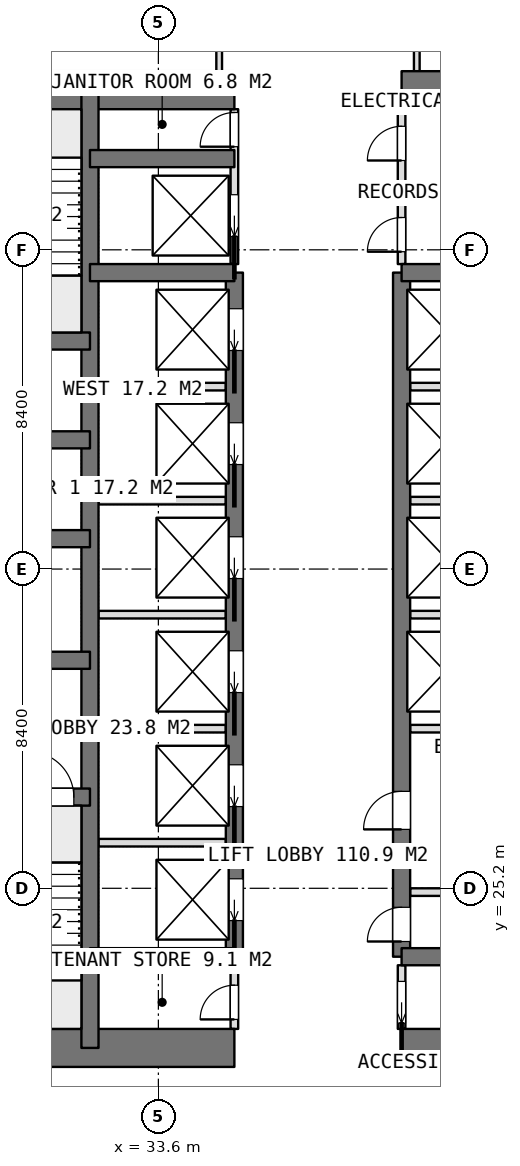
"""IFC4 building model, lengths in metres.
Left out: names, types, materials, properties, quantities, classifications, styles, units other than length and angle.
Written with IfcOpenShell. Run it as: python <this file> out.ifc"""

import sys

from ifc_helpers import new_model, si_unit, direction, frame, frame_2d, origin, place, context, subcontext, project, spatial, rectangle, extrude, element, fill, save


model = new_model("IFC4")
c1 = context("Model", 3, precision=1e-05, world=origin(), true_north=direction((0.0, 1.0)))
c2 = subcontext(c1, "Body", "Model", "MODEL_VIEW")
j1 = project(units=[si_unit("LENGTHUNIT", "METRE"), si_unit("PLANEANGLEUNIT", "RADIAN")], contexts=[c1])
p1 = place(None, origin())
s1 = spatial("IfcSite", under=j1, at=p1, CompositionType="ELEMENT")
p2 = place(p1, origin())
s2 = spatial("IfcBuilding", under=s1, at=p2, CompositionType="ELEMENT")
p3 = place(p2, frame((0.0, 0.0, 140.3)))
s3 = spatial("IfcBuildingStorey", under=s2, at=p3, CompositionType="ELEMENT", Elevation=140.3)
p4 = place(p3, frame((25.2, 21.0, 0.0), z_axis=(0.0, 0.0, 1.0), x_axis=(1.0, 0.0, 0.0)))
e1 = element("IfcWall", 1, at=p4, inside=s3, PredefinedType="SHEAR", context=c2, shape_type="SweptSolid", body=[
    extrude(rectangle(XDim=10.4, YDim=1.0, at=frame_2d((5.2, 0.0))), origin(), (0.0, 0.0, 1.0), 3.75),
])
p5 = place(p3, frame((40.0, 21.0, 0.0), z_axis=(0.0, 0.0, 1.0), x_axis=(1.0, 0.0, 0.0)))
e2 = element("IfcWall", 2, at=p5, inside=s3, PredefinedType="SHEAR", context=c2, shape_type="SweptSolid", body=[
    extrude(rectangle(XDim=10.4, YDim=1.0, at=frame_2d((5.2, 0.0))), origin(), (0.0, 0.0, 1.0), 3.75),
])
p6 = place(p3, frame((25.2, 46.2, 0.0), z_axis=(0.0, 0.0, 1.0), x_axis=(1.0, 0.0, 0.0)))
e3 = element("IfcWall", 3, at=p6, inside=s3, PredefinedType="SHEAR", context=c2, shape_type="SweptSolid", body=[
    extrude(rectangle(XDim=10.4, YDim=1.0, at=frame_2d((5.2, 0.0))), origin(), (0.0, 0.0, 1.0), 3.75),
])
p7 = place(p3, frame((40.0, 46.2, 0.0), z_axis=(0.0, 0.0, 1.0), x_axis=(1.0, 0.0, 0.0)))
e4 = element("IfcWall", 4, at=p7, inside=s3, PredefinedType="SHEAR", context=c2, shape_type="SweptSolid", body=[
    extrude(rectangle(XDim=10.4, YDim=1.0, at=frame_2d((5.2, 0.0))), origin(), (0.0, 0.0, 1.0), 3.75),
])
p8 = place(p3, frame((31.8, 21.0, 0.0), z_axis=(0.0, 0.0, 1.0), x_axis=(0.0, 1.0, 0.0)))
e5 = element("IfcWall", 5, at=p8, inside=s3, PredefinedType="SHEAR", context=c2, shape_type="SweptSolid", body=[
    extrude(rectangle(XDim=25.2, YDim=0.45, at=frame_2d((12.6, 0.0))), origin(), (0.0, 0.0, 1.0), 3.75),
])
p9 = place(p3, frame((35.6, 23.4, 0.0), z_axis=(0.0, 0.0, 1.0), x_axis=(0.0, 1.0, 0.0)))
e6 = element("IfcWall", 6, at=p9, inside=s3, PredefinedType="SHEAR", context=c2, shape_type="SweptSolid", body=[
    extrude(rectangle(XDim=18.0, YDim=0.45, at=frame_2d((9.0, 0.0))), origin(), (0.0, 0.0, 1.0), 3.75),
])
p10 = place(p9, frame((0.95, 0.0, 0.0)))
e7 = element("IfcOpeningElement", 7, at=p10, cuts=e6, PredefinedType="OPENING", context=c2, shape_type="SweptSolid", body=[
    extrude(rectangle(XDim=1.1, YDim=2.1, at=frame_2d((0.55, 1.05))), frame((0.0, 0.235, 0.0), z_axis=(0.0, -1.0, 0.0), x_axis=(1.0, 0.0, 0.0)), (0.0, 0.0, 1.0), 0.47),
])
p11 = place(p9, frame((3.95, 0.0, 0.0)))
e8 = element("IfcOpeningElement", 8, at=p11, cuts=e6, PredefinedType="OPENING", context=c2, shape_type="SweptSolid", body=[
    extrude(rectangle(XDim=1.1, YDim=2.1, at=frame_2d((0.55, 1.05))), frame((0.0, 0.235, 0.0), z_axis=(0.0, -1.0, 0.0), x_axis=(1.0, 0.0, 0.0)), (0.0, 0.0, 1.0), 0.47),
])
p12 = place(p9, frame((6.95, 0.0, 0.0)))
e9 = element("IfcOpeningElement", 9, at=p12, cuts=e6, PredefinedType="OPENING", context=c2, shape_type="SweptSolid", body=[
    extrude(rectangle(XDim=1.1, YDim=2.1, at=frame_2d((0.55, 1.05))), frame((0.0, 0.235, 0.0), z_axis=(0.0, -1.0, 0.0), x_axis=(1.0, 0.0, 0.0)), (0.0, 0.0, 1.0), 0.47),
])
p13 = place(p9, frame((9.95, 0.0, 0.0)))
e10 = element("IfcOpeningElement", 10, at=p13, cuts=e6, PredefinedType="OPENING", context=c2, shape_type="SweptSolid", body=[
    extrude(rectangle(XDim=1.1, YDim=2.1, at=frame_2d((0.55, 1.05))), frame((0.0, 0.235, 0.0), z_axis=(0.0, -1.0, 0.0), x_axis=(1.0, 0.0, 0.0)), (0.0, 0.0, 1.0), 0.47),
])
p14 = place(p9, frame((12.95, 0.0, 0.0)))
e11 = element("IfcOpeningElement", 11, at=p14, cuts=e6, PredefinedType="OPENING", context=c2, shape_type="SweptSolid", body=[
    extrude(rectangle(XDim=1.1, YDim=2.1, at=frame_2d((0.55, 1.05))), frame((0.0, 0.235, 0.0), z_axis=(0.0, -1.0, 0.0), x_axis=(1.0, 0.0, 0.0)), (0.0, 0.0, 1.0), 0.47),
])
p15 = place(p9, frame((15.95, 0.0, 0.0)))
e12 = element("IfcOpeningElement", 12, at=p15, cuts=e6, PredefinedType="OPENING", context=c2, shape_type="SweptSolid", body=[
    extrude(rectangle(XDim=1.1, YDim=2.1, at=frame_2d((0.55, 1.05))), frame((0.0, 0.235, 0.0), z_axis=(0.0, -1.0, 0.0), x_axis=(1.0, 0.0, 0.0)), (0.0, 0.0, 1.0), 0.47),
])
p16 = place(p3, frame((40.0, 23.4, 0.0), z_axis=(0.0, 0.0, 1.0), x_axis=(0.0, 1.0, 0.0)))
e13 = element("IfcWall", 13, at=p16, inside=s3, PredefinedType="SHEAR", context=c2, shape_type="SweptSolid", body=[
    extrude(rectangle(XDim=18.0, YDim=0.45, at=frame_2d((9.0, 0.0))), origin(), (0.0, 0.0, 1.0), 3.75),
])
p17 = place(p16, frame((0.4, 0.0, 0.0)))
e14 = element("IfcOpeningElement", 14, at=p17, cuts=e13, PredefinedType="OPENING", context=c2, shape_type="SweptSolid", body=[
    extrude(rectangle(XDim=0.9, YDim=2.1, at=frame_2d((0.45, 1.05))), frame((0.0, 0.235, 0.0), z_axis=(0.0, -1.0, 0.0), x_axis=(1.0, 0.0, 0.0)), (0.0, 0.0, 1.0), 0.47),
])
p18 = place(p16, frame((3.35, 0.0, 0.0)))
e15 = element("IfcOpeningElement", 15, at=p18, cuts=e13, PredefinedType="OPENING", context=c2, shape_type="SweptSolid", body=[
    extrude(rectangle(XDim=1.0, YDim=2.1, at=frame_2d((0.5, 1.05))), frame((0.0, 0.235, 0.0), z_axis=(0.0, -1.0, 0.0), x_axis=(1.0, 0.0, 0.0)), (0.0, 0.0, 1.0), 0.47),
])
for number, where, z_axis, x_axis in (
    (16, (31.8, 23.4, 0.0), (0.0, 0.0, 1.0), (1.0, 0.0, 0.0)),
    (17, (31.8, 41.4, 0.0), (0.0, 0.0, 1.0), (1.0, 0.0, 0.0)),
    (18, (31.8, 44.4, 0.0), (0.0, 0.0, 1.0), (1.0, 0.0, 0.0)),
    (19, (40.0, 23.4, 0.0), (0.0, 0.0, 1.0), (1.0, 0.0, 0.0)),
    (20, (40.0, 41.4, 0.0), (0.0, 0.0, 1.0), (1.0, 0.0, 0.0)),
):
    element("IfcWall", number, at=place(p3, frame(where, z_axis=z_axis, x_axis=x_axis)), inside=s3, PredefinedType="SHEAR", context=c2, shape_type="SweptSolid", body=[
        extrude(rectangle(XDim=3.8, YDim=0.45, at=frame_2d((1.9, 0.0))), origin(), (0.0, 0.0, 1.0), 3.75),
    ])
p19 = place(p3, frame((25.2, 27.6, 0.0), z_axis=(0.0, 0.0, 1.0), x_axis=(1.0, 0.0, 0.0)))
e21 = element("IfcWall", 21, at=p19, inside=s3, PredefinedType="SHEAR", context=c2, shape_type="SweptSolid", body=[
    extrude(rectangle(XDim=6.6, YDim=0.45, at=frame_2d((3.3, 0.0))), origin(), (0.0, 0.0, 1.0), 3.75),
])
p20 = place(p19, frame((4.975, 0.0, 0.0)))
e22 = element("IfcOpeningElement", 22, at=p20, cuts=e21, PredefinedType="OPENING", context=c2, shape_type="SweptSolid", body=[
    extrude(rectangle(XDim=1.2, YDim=2.1, at=frame_2d((0.6, 1.05))), frame((0.0, 0.235, 0.0), z_axis=(0.0, -1.0, 0.0), x_axis=(1.0, 0.0, 0.0)), (0.0, 0.0, 1.0), 0.47),
])
p21 = place(p3, frame((25.2, 31.2, 0.0), z_axis=(0.0, 0.0, 1.0), x_axis=(1.0, 0.0, 0.0)))
e23 = element("IfcWall", 23, at=p21, inside=s3, PredefinedType="SHEAR", context=c2, shape_type="SweptSolid", body=[
    extrude(rectangle(XDim=6.6, YDim=0.45, at=frame_2d((3.3, 0.0))), origin(), (0.0, 0.0, 1.0), 3.75),
])
p22 = place(p21, frame((2.65, 0.0, 0.0)))
e24 = element("IfcOpeningElement", 24, at=p22, cuts=e23, PredefinedType="OPENING", context=c2, shape_type="SweptSolid", body=[
    extrude(rectangle(XDim=1.3, YDim=2.1, at=frame_2d((0.65, 1.05))), frame((0.0, 0.235, 0.0), z_axis=(0.0, -1.0, 0.0), x_axis=(1.0, 0.0, 0.0)), (0.0, 0.0, 1.0), 0.47),
])
for number, where, z_axis, x_axis in (
    (25, (25.2, 34.4, 0.0), (0.0, 0.0, 1.0), (1.0, 0.0, 0.0)),
    (26, (25.2, 37.0, 0.0), (0.0, 0.0, 1.0), (1.0, 0.0, 0.0)),
    (27, (25.2, 39.6, 0.0), (0.0, 0.0, 1.0), (1.0, 0.0, 0.0)),
):
    element("IfcWall", number, at=place(p3, frame(where, z_axis=z_axis, x_axis=x_axis)), inside=s3, PredefinedType="SHEAR", context=c2, shape_type="SweptSolid", body=[
        extrude(rectangle(XDim=6.6, YDim=0.45, at=frame_2d((3.3, 0.0))), origin(), (0.0, 0.0, 1.0), 3.75),
    ])
for number, where, z_axis, x_axis in (
    (28, (32.025, 26.4, 0.0), (0.0, 0.0, 1.0), (1.0, 0.0, 0.0)),
    (29, (32.025, 29.4, 0.0), (0.0, 0.0, 1.0), (1.0, 0.0, 0.0)),
    (30, (32.025, 32.4, 0.0), (0.0, 0.0, 1.0), (1.0, 0.0, 0.0)),
    (31, (32.025, 35.4, 0.0), (0.0, 0.0, 1.0), (1.0, 0.0, 0.0)),
    (32, (32.025, 38.4, 0.0), (0.0, 0.0, 1.0), (1.0, 0.0, 0.0)),
):
    element("IfcWall", number, at=place(p3, frame(where, z_axis=z_axis, x_axis=x_axis)), inside=s3, PredefinedType="PARTITIONING", context=c2, shape_type="SweptSolid", body=[
        extrude(rectangle(XDim=3.35, YDim=0.2, at=frame_2d((1.675, 0.0))), origin(), (0.0, 0.0, 1.0), 3.5),
    ])
for number, where, z_axis, x_axis in (
    (33, (40.225, 29.4, 0.0), (0.0, 0.0, 1.0), (1.0, 0.0, 0.0)),
    (34, (40.225, 32.4, 0.0), (0.0, 0.0, 1.0), (1.0, 0.0, 0.0)),
    (35, (40.225, 35.4, 0.0), (0.0, 0.0, 1.0), (1.0, 0.0, 0.0)),
    (36, (40.225, 38.4, 0.0), (0.0, 0.0, 1.0), (1.0, 0.0, 0.0)),
):
    element("IfcWall", number, at=place(p3, frame(where, z_axis=z_axis, x_axis=x_axis)), inside=s3, PredefinedType="PARTITIONING", context=c2, shape_type="SweptSolid", body=[
        extrude(rectangle(XDim=3.35, YDim=0.2, at=frame_2d((1.675, 0.0))), origin(), (0.0, 0.0, 1.0), 3.5),
    ])
p23 = place(p3, frame((40.0, 21.5, 0.0), z_axis=(0.0, 0.0, 1.0), x_axis=(0.0, 1.0, 0.0)))
e37 = element("IfcWall", 37, at=p23, inside=s3, PredefinedType="PARTITIONING", context=c2, shape_type="SweptSolid", body=[
    extrude(rectangle(XDim=1.675, YDim=0.2, at=frame_2d((0.837, 0.0))), origin(), (0.0, 0.0, 1.0), 3.5),
])
p24 = place(p23, frame((0.15, 0.0, 0.0)))
e38 = element("IfcOpeningElement", 38, at=p24, cuts=e37, PredefinedType="OPENING", context=c2, shape_type="SweptSolid", body=[
    extrude(rectangle(XDim=1.1, YDim=2.1, at=frame_2d((0.55, 1.05))), frame((0.0, 0.11, 0.0), z_axis=(0.0, -1.0, 0.0), x_axis=(1.0, 0.0, 0.0)), (0.0, 0.0, 1.0), 0.22),
])
p25 = place(p3, frame((40.0, 41.625, 0.0), z_axis=(0.0, 0.0, 1.0), x_axis=(0.0, 1.0, 0.0)))
e39 = element("IfcWall", 39, at=p25, inside=s3, PredefinedType="PARTITIONING", context=c2, shape_type="SweptSolid", body=[
    extrude(rectangle(XDim=4.075, YDim=0.2, at=frame_2d((2.038, 0.0))), origin(), (0.0, 0.0, 1.0), 3.5),
])
p26 = place(p25, frame((2.725, 0.0, 0.0)))
e40 = element("IfcOpeningElement", 40, at=p26, cuts=e39, PredefinedType="OPENING", context=c2, shape_type="SweptSolid", body=[
    extrude(rectangle(XDim=0.9, YDim=2.1, at=frame_2d((0.45, 1.05))), frame((0.0, 0.11, 0.0), z_axis=(0.0, -1.0, 0.0), x_axis=(1.0, 0.0, 0.0)), (0.0, 0.0, 1.0), 0.22),
])
p27 = place(p25, frame((0.325, 0.0, 0.0)))
e41 = element("IfcOpeningElement", 41, at=p27, cuts=e39, PredefinedType="OPENING", context=c2, shape_type="SweptSolid", body=[
    extrude(rectangle(XDim=0.9, YDim=2.1, at=frame_2d((0.45, 1.05))), frame((0.0, 0.11, 0.0), z_axis=(0.0, -1.0, 0.0), x_axis=(1.0, 0.0, 0.0)), (0.0, 0.0, 1.0), 0.22),
])
p28 = place(p3, frame((35.6, 41.625, 0.0), z_axis=(0.0, 0.0, 1.0), x_axis=(0.0, 1.0, 0.0)))
e42 = element("IfcWall", 42, at=p28, inside=s3, PredefinedType="PARTITIONING", context=c2, shape_type="SweptSolid", body=[
    extrude(rectangle(XDim=4.075, YDim=0.2, at=frame_2d((2.038, 0.0))), origin(), (0.0, 0.0, 1.0), 3.5),
])
p29 = place(p28, frame((3.088, 0.0, 0.0)))
e43 = element("IfcOpeningElement", 43, at=p29, cuts=e42, PredefinedType="OPENING", context=c2, shape_type="SweptSolid", body=[
    extrude(rectangle(XDim=0.9, YDim=2.1, at=frame_2d((0.45, 1.05))), frame((0.0, 0.11, 0.0), z_axis=(0.0, -1.0, 0.0), x_axis=(1.0, 0.0, 0.0)), (0.0, 0.0, 1.0), 0.22),
])
p30 = place(p28, frame((0.725, 0.0, 0.0)))
e44 = element("IfcOpeningElement", 44, at=p30, cuts=e42, PredefinedType="OPENING", context=c2, shape_type="SweptSolid", body=[
    extrude(rectangle(XDim=1.1, YDim=2.1, at=frame_2d((0.55, 1.05))), frame((0.0, 0.11, 0.0), z_axis=(0.0, -1.0, 0.0), x_axis=(1.0, 0.0, 0.0)), (0.0, 0.0, 1.0), 0.22),
])
p31 = place(p3, frame((35.6, 21.5, 0.0), z_axis=(0.0, 0.0, 1.0), x_axis=(0.0, 1.0, 0.0)))
e45 = element("IfcWall", 45, at=p31, inside=s3, PredefinedType="PARTITIONING", context=c2, shape_type="SweptSolid", body=[
    extrude(rectangle(XDim=1.675, YDim=0.2, at=frame_2d((0.837, 0.0))), origin(), (0.0, 0.0, 1.0), 3.5),
])
p32 = place(p31, frame((0.25, 0.0, 0.0)))
e46 = element("IfcOpeningElement", 46, at=p32, cuts=e45, PredefinedType="OPENING", context=c2, shape_type="SweptSolid", body=[
    extrude(rectangle(XDim=0.9, YDim=2.1, at=frame_2d((0.45, 1.05))), frame((0.0, 0.11, 0.0), z_axis=(0.0, -1.0, 0.0), x_axis=(1.0, 0.0, 0.0)), (0.0, 0.0, 1.0), 0.22),
])
p33 = place(p3, frame((40.225, 25.1, 0.0), z_axis=(0.0, 0.0, 1.0), x_axis=(1.0, 0.0, 0.0)))
e47 = element("IfcWall", 47, at=p33, inside=s3, PredefinedType="PARTITIONING", context=c2, shape_type="SweptSolid", body=[
    extrude(rectangle(XDim=3.35, YDim=0.2, at=frame_2d((1.675, 0.0))), origin(), (0.0, 0.0, 1.0), 3.5),
])
p34 = place(p3, frame((40.0, 43.4, 0.0), z_axis=(0.0, 0.0, 1.0), x_axis=(1.0, 0.0, 0.0)))
e48 = element("IfcWall", 48, at=p34, inside=s3, PredefinedType="PARTITIONING", context=c2, shape_type="SweptSolid", body=[
    extrude(rectangle(XDim=3.575, YDim=0.2, at=frame_2d((1.788, 0.0))), origin(), (0.0, 0.0, 1.0), 3.5),
])
for number, where, z_axis, x_axis in (
    (49, (40.4, 46.7, 0.0), (0.0, 0.0, 1.0), (0.0, 1.0, 0.0)),
    (50, (35.2, 46.7, 0.0), (0.0, 0.0, 1.0), (0.0, 1.0, 0.0)),
):
    element("IfcWall", number, at=place(p3, frame(where, z_axis=z_axis, x_axis=x_axis)), inside=s3, PredefinedType="PARTITIONING", context=c2, shape_type="SweptSolid", body=[
        extrude(rectangle(XDim=2.625, YDim=0.15, at=frame_2d((1.312, 0.0))), origin(), (0.0, 0.0, 1.0), 3.5),
    ])
p35 = place(p24, origin())
e51 = element("IfcDoor", 51, at=p35, inside=s3, OperationType="SLIDING_TO_LEFT", PredefinedType="DOOR", context=c2, shape_type="SweptSolid", body=[
    extrude(rectangle(XDim=1.1, YDim=2.1, at=frame_2d((0.55, 1.05))), frame((0.0, 0.025, 0.0), z_axis=(0.0, -1.0, 0.0), x_axis=(1.0, 0.0, 0.0)), (0.0, 0.0, 1.0), 0.05),
])
fill(e38, e51)
p36 = place(p32, origin())
e52 = element("IfcDoor", 52, at=p36, inside=s3, OperationType="SINGLE_SWING_LEFT", PredefinedType="DOOR", context=c2, shape_type="SweptSolid", body=[
    extrude(rectangle(XDim=0.9, YDim=2.1, at=frame_2d((0.45, 1.05))), frame((0.0, 0.025, 0.0), z_axis=(0.0, -1.0, 0.0), x_axis=(1.0, 0.0, 0.0)), (0.0, 0.0, 1.0), 0.05),
])
fill(e46, e52)
p37 = place(p26, origin())
e53 = element("IfcDoor", 53, at=p37, inside=s3, OperationType="SINGLE_SWING_LEFT", PredefinedType="DOOR", context=c2, shape_type="SweptSolid", body=[
    extrude(rectangle(XDim=0.9, YDim=2.1, at=frame_2d((0.45, 1.05))), frame((0.0, 0.025, 0.0), z_axis=(0.0, -1.0, 0.0), x_axis=(1.0, 0.0, 0.0)), (0.0, 0.0, 1.0), 0.05),
])
fill(e40, e53)
p38 = place(p27, origin())
e54 = element("IfcDoor", 54, at=p38, inside=s3, OperationType="SINGLE_SWING_LEFT", PredefinedType="DOOR", context=c2, shape_type="SweptSolid", body=[
    extrude(rectangle(XDim=0.9, YDim=2.1, at=frame_2d((0.45, 1.05))), frame((0.0, 0.025, 0.0), z_axis=(0.0, -1.0, 0.0), x_axis=(1.0, 0.0, 0.0)), (0.0, 0.0, 1.0), 0.05),
])
fill(e41, e54)
p39 = place(p17, origin())
e55 = element("IfcDoor", 55, at=p39, inside=s3, OperationType="SINGLE_SWING_LEFT", PredefinedType="DOOR", context=c2, shape_type="SweptSolid", body=[
    extrude(rectangle(XDim=0.9, YDim=2.1, at=frame_2d((0.45, 1.05))), frame((0.0, 0.025, 0.0), z_axis=(0.0, -1.0, 0.0), x_axis=(1.0, 0.0, 0.0)), (0.0, 0.0, 1.0), 0.05),
])
fill(e14, e55)
p40 = place(p18, origin())
e56 = element("IfcDoor", 56, at=p40, inside=s3, OperationType="SINGLE_SWING_LEFT", PredefinedType="DOOR", context=c2, shape_type="SweptSolid", body=[
    extrude(rectangle(XDim=1.0, YDim=2.1, at=frame_2d((0.5, 1.05))), frame((0.0, 0.025, 0.0), z_axis=(0.0, -1.0, 0.0), x_axis=(1.0, 0.0, 0.0)), (0.0, 0.0, 1.0), 0.05),
])
fill(e15, e56)
p41 = place(p29, origin())
e57 = element("IfcDoor", 57, at=p41, inside=s3, OperationType="SINGLE_SWING_LEFT", PredefinedType="DOOR", context=c2, shape_type="SweptSolid", body=[
    extrude(rectangle(XDim=0.9, YDim=2.1, at=frame_2d((0.45, 1.05))), frame((0.0, 0.025, 0.0), z_axis=(0.0, -1.0, 0.0), x_axis=(1.0, 0.0, 0.0)), (0.0, 0.0, 1.0), 0.05),
])
fill(e43, e57)
p42 = place(p10, origin())
e58 = element("IfcDoor", 58, at=p42, inside=s3, OperationType="SLIDING_TO_LEFT", PredefinedType="USERDEFINED", context=c2, shape_type="SweptSolid", body=[
    extrude(rectangle(XDim=1.1, YDim=2.1, at=frame_2d((0.55, 1.05))), frame((0.0, 0.025, 0.0), z_axis=(0.0, -1.0, 0.0), x_axis=(1.0, 0.0, 0.0)), (0.0, 0.0, 1.0), 0.05),
])
fill(e7, e58)
p43 = place(p11, origin())
e59 = element("IfcDoor", 59, at=p43, inside=s3, OperationType="SLIDING_TO_LEFT", PredefinedType="USERDEFINED", context=c2, shape_type="SweptSolid", body=[
    extrude(rectangle(XDim=1.1, YDim=2.1, at=frame_2d((0.55, 1.05))), frame((0.0, 0.025, 0.0), z_axis=(0.0, -1.0, 0.0), x_axis=(1.0, 0.0, 0.0)), (0.0, 0.0, 1.0), 0.05),
])
fill(e8, e59)
p44 = place(p12, origin())
e60 = element("IfcDoor", 60, at=p44, inside=s3, OperationType="SLIDING_TO_LEFT", PredefinedType="USERDEFINED", context=c2, shape_type="SweptSolid", body=[
    extrude(rectangle(XDim=1.1, YDim=2.1, at=frame_2d((0.55, 1.05))), frame((0.0, 0.025, 0.0), z_axis=(0.0, -1.0, 0.0), x_axis=(1.0, 0.0, 0.0)), (0.0, 0.0, 1.0), 0.05),
])
fill(e9, e60)
p45 = place(p13, origin())
e61 = element("IfcDoor", 61, at=p45, inside=s3, OperationType="SLIDING_TO_LEFT", PredefinedType="USERDEFINED", context=c2, shape_type="SweptSolid", body=[
    extrude(rectangle(XDim=1.1, YDim=2.1, at=frame_2d((0.55, 1.05))), frame((0.0, 0.025, 0.0), z_axis=(0.0, -1.0, 0.0), x_axis=(1.0, 0.0, 0.0)), (0.0, 0.0, 1.0), 0.05),
])
fill(e10, e61)
p46 = place(p14, origin())
e62 = element("IfcDoor", 62, at=p46, inside=s3, OperationType="SLIDING_TO_LEFT", PredefinedType="USERDEFINED", context=c2, shape_type="SweptSolid", body=[
    extrude(rectangle(XDim=1.1, YDim=2.1, at=frame_2d((0.55, 1.05))), frame((0.0, 0.025, 0.0), z_axis=(0.0, -1.0, 0.0), x_axis=(1.0, 0.0, 0.0)), (0.0, 0.0, 1.0), 0.05),
])
fill(e11, e62)
p47 = place(p15, origin())
e63 = element("IfcDoor", 63, at=p47, inside=s3, OperationType="SLIDING_TO_LEFT", PredefinedType="USERDEFINED", context=c2, shape_type="SweptSolid", body=[
    extrude(rectangle(XDim=1.1, YDim=2.1, at=frame_2d((0.55, 1.05))), frame((0.0, 0.025, 0.0), z_axis=(0.0, -1.0, 0.0), x_axis=(1.0, 0.0, 0.0)), (0.0, 0.0, 1.0), 0.05),
])
fill(e12, e63)
p48 = place(p30, origin())
e64 = element("IfcDoor", 64, at=p48, inside=s3, OperationType="SLIDING_TO_LEFT", PredefinedType="USERDEFINED", context=c2, shape_type="SweptSolid", body=[
    extrude(rectangle(XDim=1.1, YDim=2.1, at=frame_2d((0.55, 1.05))), frame((0.0, 0.025, 0.0), z_axis=(0.0, -1.0, 0.0), x_axis=(1.0, 0.0, 0.0)), (0.0, 0.0, 1.0), 0.05),
])
fill(e44, e64)
p49 = place(p20, origin())
e65 = element("IfcDoor", 65, at=p49, inside=s3, OperationType="SINGLE_SWING_RIGHT", PredefinedType="DOOR", context=c2, shape_type="SweptSolid", body=[
    extrude(rectangle(XDim=1.2, YDim=2.1, at=frame_2d((0.6, 1.05))), frame((0.0, 0.025, 0.0), z_axis=(0.0, -1.0, 0.0), x_axis=(1.0, 0.0, 0.0)), (0.0, 0.0, 1.0), 0.05),
])
fill(e22, e65)
save(model, sys.argv[1])
